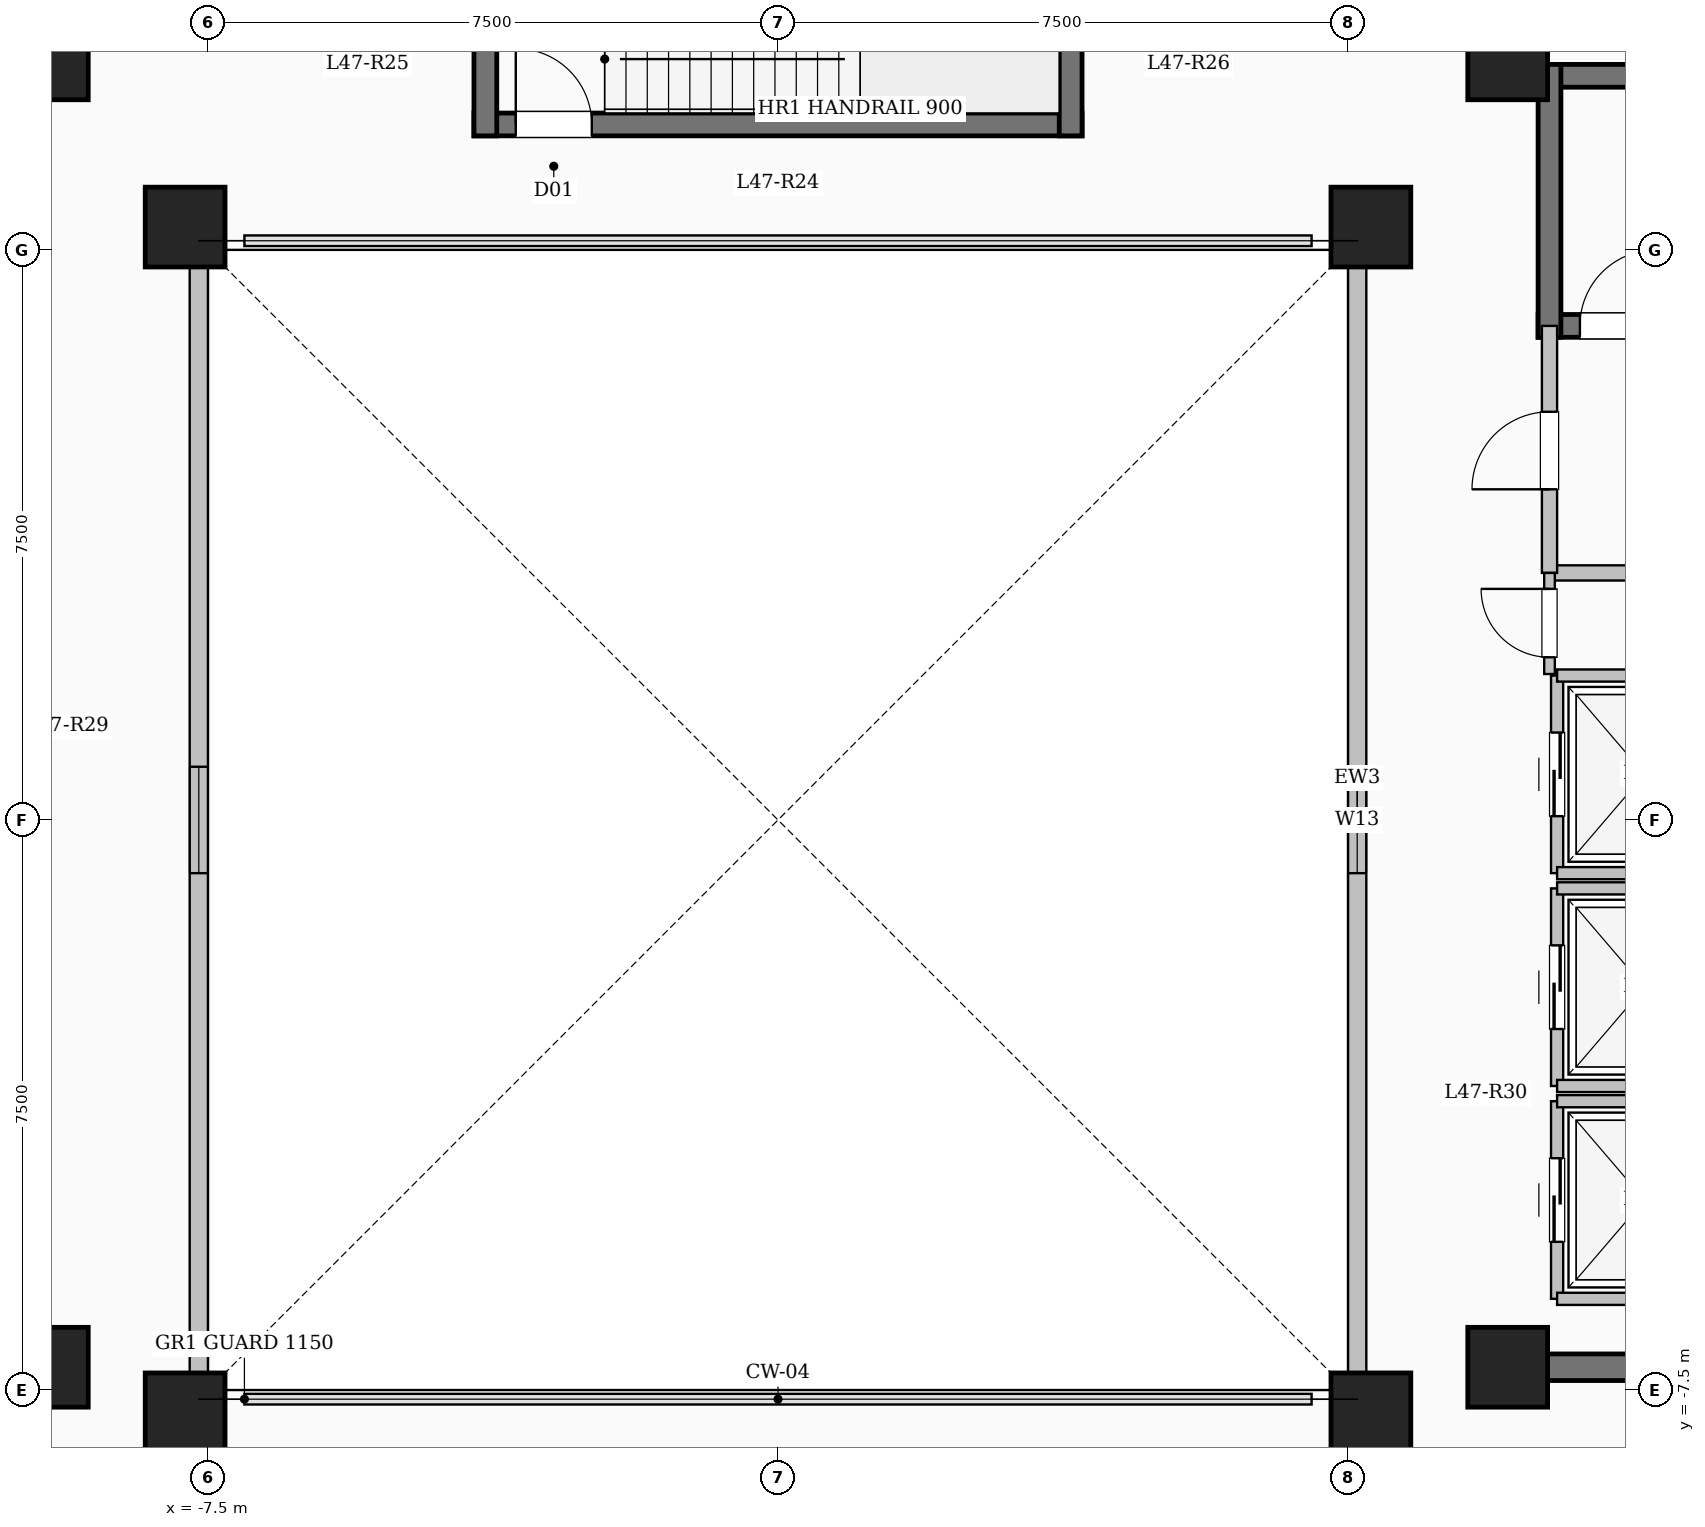
"""IFC4 building model, lengths in metres.
Left out: names, types, materials, properties, quantities, classifications, styles, units other than length and angle.
Written with IfcOpenShell. Run it as: python <this file> out.ifc"""

import sys

from ifc_helpers import new_model, si_unit, direction, frame, frame_2d, origin, origin_2d, place, context, subcontext, project, spatial, rectangle, extrude, element, fill, save


model = new_model("IFC4")
c1 = context("Model", 3, precision=1e-05, world=origin(), true_north=direction((0.0, 1.0)))
c2 = subcontext(c1, "Body", "Model", "MODEL_VIEW")
j1 = project(units=[si_unit("LENGTHUNIT", "METRE"), si_unit("PLANEANGLEUNIT", "RADIAN")], contexts=[c1])
p1 = place(None, origin())
s1 = spatial("IfcSite", under=j1, at=p1, CompositionType="ELEMENT")
p2 = place(p1, origin())
s2 = spatial("IfcBuilding", under=s1, at=p2, CompositionType="ELEMENT")
p3 = place(p2, frame((0.0, 0.0, 172.8)))
s3 = spatial("IfcBuildingStorey", under=s2, at=p3, CompositionType="ELEMENT", Elevation=172.8)
for number, where, z_axis, x_axis in (
    (1, (-7.8, -7.8, 0.0), (0.0, 0.0, 1.0), (1.0, 0.0, 0.0)),
    (2, (7.8, -7.8, 0.0), (0.0, 0.0, 1.0), (1.0, 0.0, 0.0)),
    (3, (-7.8, 7.8, 0.0), (0.0, 0.0, 1.0), (1.0, 0.0, 0.0)),
    (4, (7.8, 7.8, 0.0), (0.0, 0.0, 1.0), (1.0, 0.0, 0.0)),
    (5, (-9.6, -7.2, 0.0), (0.0, 0.0, 1.0), (1.0, 0.0, 0.0)),
    (6, (-9.6, 10.0, 0.0), (0.0, 0.0, 1.0), (1.0, 0.0, 0.0)),
    (7, (9.6, -7.2, 0.0), (0.0, 0.0, 1.0), (1.0, 0.0, 0.0)),
    (8, (9.6, 10.0, 0.0), (0.0, 0.0, 1.0), (1.0, 0.0, 0.0)),
):
    element("IfcColumn", number, at=place(p3, frame(where, z_axis=z_axis, x_axis=x_axis)), inside=s3, PredefinedType="COLUMN", context=c2, shape_type="SweptSolid", body=[
        extrude(rectangle(XDim=1.05, YDim=1.05, at=origin_2d()), origin(), (0.0, 0.0, 1.0), 4.5),
    ])
p4 = place(p3, frame((7.62, -7.62, 0.0), z_axis=(0.0, 0.0, 1.0), x_axis=(0.0, 1.0, 0.0)))
e9 = element("IfcWall", 9, at=p4, inside=s3, PredefinedType="SOLIDWALL", context=c2, shape_type="SweptSolid", body=[
    extrude(rectangle(XDim=15.24, YDim=0.24, at=frame_2d((7.62, 0.0))), origin(), (0.0, 0.0, 1.0), 4.2),
])
p5 = place(p4, frame((6.92, 0.0, 0.95)))
e10 = element("IfcOpeningElement", 10, at=p5, cuts=e9, PredefinedType="OPENING", context=c2, shape_type="SweptSolid", body=[
    extrude(rectangle(XDim=1.4, YDim=1.5, at=frame_2d((0.7, 0.75))), frame((0.0, 0.13, 0.0), z_axis=(0.0, -1.0, 0.0), x_axis=(1.0, 0.0, 0.0)), (0.0, 0.0, 1.0), 0.26),
])
p6 = place(p3, frame((-7.62, 7.62, 0.0), z_axis=(0.0, 0.0, 1.0), x_axis=(0.0, -1.0, 0.0)))
e11 = element("IfcWall", 11, at=p6, inside=s3, PredefinedType="SOLIDWALL", context=c2, shape_type="SweptSolid", body=[
    extrude(rectangle(XDim=15.24, YDim=0.24, at=frame_2d((7.62, 0.0))), origin(), (0.0, 0.0, 1.0), 4.2),
])
p7 = place(p6, frame((6.92, 0.0, 0.95)))
e12 = element("IfcOpeningElement", 12, at=p7, cuts=e11, PredefinedType="OPENING", context=c2, shape_type="SweptSolid", body=[
    extrude(rectangle(XDim=1.4, YDim=1.5, at=frame_2d((0.7, 0.75))), frame((0.0, 0.13, 0.0), z_axis=(0.0, -1.0, 0.0), x_axis=(1.0, 0.0, 0.0)), (0.0, 0.0, 1.0), 0.26),
])
p8 = place(p3, frame((10.0, 9.79, 0.0), z_axis=(0.0, 0.0, 1.0), x_axis=(1.0, 0.0, 0.0)))
e13 = element("IfcWall", 13, at=p8, inside=s3, PredefinedType="SHEAR", context=c2, shape_type="SweptSolid", body=[
    extrude(rectangle(XDim=8.0, YDim=0.3, at=frame_2d((4.0, 0.0))), origin(), (0.0, 0.0, 1.0), 4.5),
])
p9 = place(p3, frame((10.0, 6.5, 0.0), z_axis=(0.0, 0.0, 1.0), x_axis=(1.0, 0.0, 0.0)))
e14 = element("IfcWall", 14, at=p9, inside=s3, PredefinedType="SHEAR", context=c2, shape_type="SweptSolid", body=[
    extrude(rectangle(XDim=8.0, YDim=0.3, at=frame_2d((4.0, 0.0))), origin(), (0.0, 0.0, 1.0), 4.5),
])
p10 = place(p9, frame((0.55, 0.0, 0.0)))
e15 = element("IfcOpeningElement", 15, at=p10, cuts=e14, PredefinedType="OPENING", context=c2, shape_type="SweptSolid", body=[
    extrude(rectangle(XDim=1.0, YDim=2.15, at=frame_2d((0.5, 1.075))), frame((0.0, 0.16, 0.0), z_axis=(0.0, -1.0, 0.0), x_axis=(1.0, 0.0, 0.0)), (0.0, 0.0, 1.0), 0.32),
])
p11 = place(p3, frame((10.15, 6.35, 0.0), z_axis=(0.0, 0.0, 1.0), x_axis=(0.0, 1.0, 0.0)))
e16 = element("IfcWall", 16, at=p11, inside=s3, PredefinedType="SHEAR", context=c2, shape_type="SweptSolid", body=[
    extrude(rectangle(XDim=3.59, YDim=0.3, at=frame_2d((1.795, 0.0))), origin(), (0.0, 0.0, 1.0), 4.5),
])
p12 = place(p3, frame((-4.0, 9.15, 0.0), z_axis=(0.0, 0.0, 1.0), x_axis=(1.0, 0.0, 0.0)))
e17 = element("IfcWall", 17, at=p12, inside=s3, PredefinedType="SHEAR", context=c2, shape_type="SweptSolid", body=[
    extrude(rectangle(XDim=8.0, YDim=0.3, at=frame_2d((4.0, 0.0))), origin(), (0.0, 0.0, 1.0), 4.5),
])
p13 = place(p12, frame((0.55, 0.0, 0.0)))
e18 = element("IfcOpeningElement", 18, at=p13, cuts=e17, PredefinedType="OPENING", context=c2, shape_type="SweptSolid", body=[
    extrude(rectangle(XDim=1.0, YDim=2.15, at=frame_2d((0.5, 1.075))), frame((0.0, 0.16, 0.0), z_axis=(0.0, -1.0, 0.0), x_axis=(1.0, 0.0, 0.0)), (0.0, 0.0, 1.0), 0.32),
])
for number, where, z_axis, x_axis in (
    (19, (-3.85, 9.0, 0.0), (0.0, 0.0, 1.0), (0.0, 1.0, 0.0)),
    (20, (3.85, 9.0, 0.0), (0.0, 0.0, 1.0), (0.0, 1.0, 0.0)),
):
    element("IfcWall", number, at=place(p3, frame(where, z_axis=z_axis, x_axis=x_axis)), inside=s3, PredefinedType="SHEAR", context=c2, shape_type="SweptSolid", body=[
        extrude(rectangle(XDim=3.59, YDim=0.3, at=frame_2d((1.795, 0.0))), origin(), (0.0, 0.0, 1.0), 4.5),
    ])
p14 = place(p3, frame((10.15, 3.25, 0.0), z_axis=(0.0, 0.0, 1.0), x_axis=(1.0, 0.0, 0.0)))
e21 = element("IfcWall", 21, at=p14, inside=s3, PredefinedType="SOLIDWALL", context=c2, shape_type="SweptSolid", body=[
    extrude(rectangle(XDim=5.4, YDim=0.2, at=frame_2d((2.7, 0.0))), origin(), (0.0, 0.0, 1.0), 4.2),
])
p15 = place(p3, frame((10.15, 3.25, 0.0), z_axis=(0.0, 0.0, 1.0), x_axis=(0.0, 1.0, 0.0)))
e22 = element("IfcWall", 22, at=p15, inside=s3, PredefinedType="SOLIDWALL", context=c2, shape_type="SweptSolid", body=[
    extrude(rectangle(XDim=3.25, YDim=0.2, at=frame_2d((1.625, 0.0))), origin(), (0.0, 0.0, 1.0), 4.2),
])
p16 = place(p15, frame((1.1, 0.0, 0.0)))
e23 = element("IfcOpeningElement", 23, at=p16, cuts=e22, PredefinedType="OPENING", context=c2, shape_type="SweptSolid", body=[
    extrude(rectangle(XDim=1.02, YDim=2.15, at=frame_2d((0.51, 1.075))), frame((0.0, 0.11, 0.0), z_axis=(0.0, -1.0, 0.0), x_axis=(1.0, 0.0, 0.0)), (0.0, 0.0, 1.0), 0.22),
])
p17 = place(p3, frame((10.25, -6.3, 0.0), z_axis=(0.0, 0.0, 1.0), x_axis=(0.0, 1.0, 0.0)))
e24 = element("IfcWall", 24, at=p17, inside=s3, PredefinedType="SOLIDWALL", context=c2, shape_type="SweptSolid", body=[
    extrude(rectangle(XDim=2.6, YDim=0.16, at=frame_2d((1.3, 0.0))), origin(), (0.0, 0.0, 1.0), 4.2),
])
p18 = place(p17, frame((0.75, 0.0, 0.0)))
e25 = element("IfcOpeningElement", 25, at=p18, cuts=e24, PredefinedType="OPENING", context=c2, shape_type="SweptSolid", body=[
    extrude(rectangle(XDim=1.1, YDim=2.15, at=frame_2d((0.55, 1.075))), frame((0.0, 0.09, 0.0), z_axis=(0.0, -1.0, 0.0), x_axis=(1.0, 0.0, 0.0)), (0.0, 0.0, 1.0), 0.18),
])
for number, where, z_axis, x_axis in (
    (26, (10.25, -6.3, 0.0), (0.0, 0.0, 1.0), (1.0, 0.0, 0.0)),
    (27, (10.25, -3.7, 0.0), (0.0, 0.0, 1.0), (1.0, 0.0, 0.0)),
):
    element("IfcWall", number, at=place(p3, frame(where, z_axis=z_axis, x_axis=x_axis)), inside=s3, PredefinedType="SOLIDWALL", context=c2, shape_type="SweptSolid", body=[
        extrude(rectangle(XDim=2.3, YDim=0.16, at=frame_2d((1.15, 0.0))), origin(), (0.0, 0.0, 1.0), 4.2),
    ])
p19 = place(p3, frame((10.25, -3.5, 0.0), z_axis=(0.0, 0.0, 1.0), x_axis=(0.0, 1.0, 0.0)))
e28 = element("IfcWall", 28, at=p19, inside=s3, PredefinedType="SOLIDWALL", context=c2, shape_type="SweptSolid", body=[
    extrude(rectangle(XDim=2.6, YDim=0.16, at=frame_2d((1.3, 0.0))), origin(), (0.0, 0.0, 1.0), 4.2),
])
p20 = place(p19, frame((0.75, 0.0, 0.0)))
e29 = element("IfcOpeningElement", 29, at=p20, cuts=e28, PredefinedType="OPENING", context=c2, shape_type="SweptSolid", body=[
    extrude(rectangle(XDim=1.1, YDim=2.15, at=frame_2d((0.55, 1.075))), frame((0.0, 0.09, 0.0), z_axis=(0.0, -1.0, 0.0), x_axis=(1.0, 0.0, 0.0)), (0.0, 0.0, 1.0), 0.18),
])
for number, where, z_axis, x_axis in (
    (30, (10.25, -3.5, 0.0), (0.0, 0.0, 1.0), (1.0, 0.0, 0.0)),
    (31, (10.25, -0.9, 0.0), (0.0, 0.0, 1.0), (1.0, 0.0, 0.0)),
):
    element("IfcWall", number, at=place(p3, frame(where, z_axis=z_axis, x_axis=x_axis)), inside=s3, PredefinedType="SOLIDWALL", context=c2, shape_type="SweptSolid", body=[
        extrude(rectangle(XDim=2.3, YDim=0.16, at=frame_2d((1.15, 0.0))), origin(), (0.0, 0.0, 1.0), 4.2),
    ])
p21 = place(p3, frame((10.25, -0.7, 0.0), z_axis=(0.0, 0.0, 1.0), x_axis=(0.0, 1.0, 0.0)))
e32 = element("IfcWall", 32, at=p21, inside=s3, PredefinedType="SOLIDWALL", context=c2, shape_type="SweptSolid", body=[
    extrude(rectangle(XDim=2.6, YDim=0.16, at=frame_2d((1.3, 0.0))), origin(), (0.0, 0.0, 1.0), 4.2),
])
p22 = place(p21, frame((0.75, 0.0, 0.0)))
e33 = element("IfcOpeningElement", 33, at=p22, cuts=e32, PredefinedType="OPENING", context=c2, shape_type="SweptSolid", body=[
    extrude(rectangle(XDim=1.1, YDim=2.15, at=frame_2d((0.55, 1.075))), frame((0.0, 0.09, 0.0), z_axis=(0.0, -1.0, 0.0), x_axis=(1.0, 0.0, 0.0)), (0.0, 0.0, 1.0), 0.18),
])
for number, where, z_axis, x_axis in (
    (34, (10.25, -0.7, 0.0), (0.0, 0.0, 1.0), (1.0, 0.0, 0.0)),
    (35, (10.25, 1.9, 0.0), (0.0, 0.0, 1.0), (1.0, 0.0, 0.0)),
):
    element("IfcWall", number, at=place(p3, frame(where, z_axis=z_axis, x_axis=x_axis)), inside=s3, PredefinedType="SOLIDWALL", context=c2, shape_type="SweptSolid", body=[
        extrude(rectangle(XDim=2.3, YDim=0.16, at=frame_2d((1.15, 0.0))), origin(), (0.0, 0.0, 1.0), 4.2),
    ])
p23 = place(p3, frame((10.075, -7.2, 0.0), z_axis=(0.0, 0.0, 1.0), x_axis=(1.0, 0.0, 0.0)))
e36 = element("IfcWall", 36, at=p23, inside=s3, PredefinedType="SHEAR", context=c2, shape_type="SweptSolid", body=[
    extrude(rectangle(XDim=8.55, YDim=0.35, at=frame_2d((4.275, 0.0))), origin(), (0.0, 0.0, 1.0), 4.5),
])
p24 = place(p3, frame((10.15, 1.92, 0.0), z_axis=(0.0, 0.0, 1.0), x_axis=(0.0, 1.0, 0.0)))
e37 = element("IfcWall", 37, at=p24, inside=s3, PredefinedType="PARTITIONING", context=c2, shape_type="SweptSolid", body=[
    extrude(rectangle(XDim=1.33, YDim=0.14, at=frame_2d((0.665, 0.0))), origin(), (0.0, 0.0, 1.0), 4.2),
])
p25 = place(p24, frame((0.22, 0.0, 0.0)))
e38 = element("IfcOpeningElement", 38, at=p25, cuts=e37, PredefinedType="OPENING", context=c2, shape_type="SweptSolid", body=[
    extrude(rectangle(XDim=0.9, YDim=2.08, at=frame_2d((0.45, 1.04))), frame((0.0, 0.08, 0.0), z_axis=(0.0, -1.0, 0.0), x_axis=(1.0, 0.0, 0.0)), (0.0, 0.0, 1.0), 0.16),
])
p26 = place(p5, origin())
e39 = element("IfcWindow", 39, at=p26, inside=s3, PartitioningType="SINGLE_PANEL", PredefinedType="WINDOW", context=c2, shape_type="SweptSolid", body=[
    extrude(rectangle(XDim=1.4, YDim=1.5, at=frame_2d((0.7, 0.75))), frame((0.0, 0.03, 0.0), z_axis=(0.0, -1.0, 0.0), x_axis=(1.0, 0.0, 0.0)), (0.0, 0.0, 1.0), 0.06),
])
fill(e10, e39)
p27 = place(p7, origin())
e40 = element("IfcWindow", 40, at=p27, inside=s3, PartitioningType="SINGLE_PANEL", PredefinedType="WINDOW", context=c2, shape_type="SweptSolid", body=[
    extrude(rectangle(XDim=1.4, YDim=1.5, at=frame_2d((0.7, 0.75))), frame((0.0, 0.03, 0.0), z_axis=(0.0, -1.0, 0.0), x_axis=(1.0, 0.0, 0.0)), (0.0, 0.0, 1.0), 0.06),
])
fill(e12, e40)
p28 = place(p10, origin())
e41 = element("IfcDoor", 41, at=p28, inside=s3, OperationType="SINGLE_SWING_RIGHT", PredefinedType="DOOR", context=c2, shape_type="SweptSolid", body=[
    extrude(rectangle(XDim=1.0, YDim=2.15, at=frame_2d((0.5, 1.075))), frame((0.0, 0.025, 0.0), z_axis=(0.0, -1.0, 0.0), x_axis=(1.0, 0.0, 0.0)), (0.0, 0.0, 1.0), 0.05),
])
fill(e15, e41)
p29 = place(p13, origin())
e42 = element("IfcDoor", 42, at=p29, inside=s3, OperationType="SINGLE_SWING_LEFT", PredefinedType="DOOR", context=c2, shape_type="SweptSolid", body=[
    extrude(rectangle(XDim=1.0, YDim=2.15, at=frame_2d((0.5, 1.075))), frame((0.0, 0.025, 0.0), z_axis=(0.0, -1.0, 0.0), x_axis=(1.0, 0.0, 0.0)), (0.0, 0.0, 1.0), 0.05),
])
fill(e18, e42)
p30 = place(p16, origin())
e43 = element("IfcDoor", 43, at=p30, inside=s3, OperationType="SINGLE_SWING_LEFT", PredefinedType="DOOR", context=c2, shape_type="SweptSolid", body=[
    extrude(rectangle(XDim=1.02, YDim=2.15, at=frame_2d((0.51, 1.075))), frame((0.0, 0.025, 0.0), z_axis=(0.0, -1.0, 0.0), x_axis=(1.0, 0.0, 0.0)), (0.0, 0.0, 1.0), 0.05),
])
fill(e23, e43)
p31 = place(p18, origin())
e44 = element("IfcDoor", 44, at=p31, inside=s3, OperationType="SLIDING_TO_LEFT", PredefinedType="DOOR", context=c2, shape_type="SweptSolid", body=[
    extrude(rectangle(XDim=1.1, YDim=2.15, at=frame_2d((0.55, 1.075))), frame((0.0, 0.025, 0.0), z_axis=(0.0, -1.0, 0.0), x_axis=(1.0, 0.0, 0.0)), (0.0, 0.0, 1.0), 0.05),
])
fill(e25, e44)
p32 = place(p20, origin())
e45 = element("IfcDoor", 45, at=p32, inside=s3, OperationType="SLIDING_TO_LEFT", PredefinedType="DOOR", context=c2, shape_type="SweptSolid", body=[
    extrude(rectangle(XDim=1.1, YDim=2.15, at=frame_2d((0.55, 1.075))), frame((0.0, 0.025, 0.0), z_axis=(0.0, -1.0, 0.0), x_axis=(1.0, 0.0, 0.0)), (0.0, 0.0, 1.0), 0.05),
])
fill(e29, e45)
p33 = place(p22, origin())
e46 = element("IfcDoor", 46, at=p33, inside=s3, OperationType="SLIDING_TO_LEFT", PredefinedType="DOOR", context=c2, shape_type="SweptSolid", body=[
    extrude(rectangle(XDim=1.1, YDim=2.15, at=frame_2d((0.55, 1.075))), frame((0.0, 0.025, 0.0), z_axis=(0.0, -1.0, 0.0), x_axis=(1.0, 0.0, 0.0)), (0.0, 0.0, 1.0), 0.05),
])
fill(e33, e46)
p34 = place(p25, origin())
e47 = element("IfcDoor", 47, at=p34, inside=s3, OperationType="SINGLE_SWING_RIGHT", PredefinedType="DOOR", context=c2, shape_type="SweptSolid", body=[
    extrude(rectangle(XDim=0.9, YDim=2.08, at=frame_2d((0.45, 1.04))), frame((0.0, 0.025, 0.0), z_axis=(0.0, -1.0, 0.0), x_axis=(1.0, 0.0, 0.0)), (0.0, 0.0, 1.0), 0.05),
])
fill(e38, e47)
save(model, sys.argv[1])
